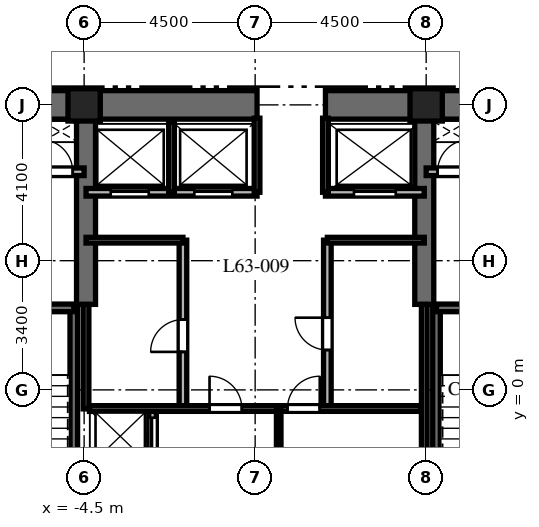
"""IFC4 building model, lengths in metres.
Left out: names, types, materials, properties, quantities, classifications, styles, units other than length and angle.
Written with IfcOpenShell. Run it as: python <this file> out.ifc"""

import sys

from ifc_helpers import new_model, si_unit, direction, frame, frame_2d, origin, origin_2d, place, context, subcontext, project, spatial, rectangle, extrude, element, fill, save


model = new_model("IFC4")
c1 = context("Model", 3, precision=1e-05, world=origin(), true_north=direction((0.0, 1.0)))
c2 = subcontext(c1, "Body", "Model", "MODEL_VIEW")
j1 = project(units=[si_unit("LENGTHUNIT", "METRE"), si_unit("PLANEANGLEUNIT", "RADIAN")], contexts=[c1])
p1 = place(None, origin())
s1 = spatial("IfcSite", under=j1, at=p1, CompositionType="ELEMENT")
p2 = place(p1, origin())
s2 = spatial("IfcBuilding", under=s1, at=p2, CompositionType="ELEMENT")
p3 = place(p2, frame((0.0, 0.0, 252.1)))
s3 = spatial("IfcBuildingStorey", under=s2, at=p3, CompositionType="ELEMENT", Elevation=252.1)
p4 = place(p3, frame((-9.375, 7.5, 0.0), z_axis=(0.0, 0.0, 1.0), x_axis=(1.0, 0.0, 0.0)))
e1 = element("IfcWall", 1, at=p4, inside=s3, PredefinedType="SHEAR", context=c2, shape_type="SweptSolid", body=[
    extrude(rectangle(XDim=9.425, YDim=0.75, at=frame_2d((4.712, 0.0))), origin(), (0.0, 0.0, 1.0), 3.8),
])
p5 = place(p3, frame((1.85, 7.5, 0.0), z_axis=(0.0, 0.0, 1.0), x_axis=(1.0, 0.0, 0.0)))
e2 = element("IfcWall", 2, at=p5, inside=s3, PredefinedType="SHEAR", context=c2, shape_type="SweptSolid", body=[
    extrude(rectangle(XDim=7.525, YDim=0.75, at=frame_2d((3.762, 0.0))), origin(), (0.0, 0.0, 1.0), 3.8),
])
for number, where, z_axis, x_axis in (
    (3, (-4.45, 2.25, 0.0), (0.0, 0.0, 1.0), (0.0, 1.0, 0.0)),
    (4, (4.45, 2.25, 0.0), (0.0, 0.0, 1.0), (0.0, 1.0, 0.0)),
):
    element("IfcWall", number, at=place(p3, frame(where, z_axis=z_axis, x_axis=x_axis)), inside=s3, PredefinedType="SHEAR", context=c2, shape_type="SweptSolid", body=[
        extrude(rectangle(XDim=4.875, YDim=0.5, at=frame_2d((2.438, 0.0))), origin(), (0.0, 0.0, 1.0), 3.8),
    ])
p6 = place(p3, frame((-4.772, -6.985, 0.0), z_axis=(0.0, 0.0, 1.0), x_axis=(0.0, 1.0, 0.0)))
e5 = element("IfcWall", 5, at=p6, inside=s3, PredefinedType="SHEAR", context=c2, shape_type="SweptSolid", body=[
    extrude(rectangle(XDim=9.143, YDim=0.2, at=frame_2d((4.572, 0.0))), origin(), (0.0, 0.0, 1.0), 3.8),
])
p7 = place(p3, frame((-8.458, 2.158, 0.0), z_axis=(0.0, 0.0, 1.0), x_axis=(1.0, 0.0, 0.0)))
e6 = element("IfcWall", 6, at=p7, inside=s3, PredefinedType="SHEAR", context=c2, shape_type="SweptSolid", body=[
    extrude(rectangle(XDim=3.686, YDim=0.2, at=frame_2d((1.843, 0.0))), origin(), (0.0, 0.0, 1.0), 3.8),
])
p8 = place(p7, frame((1.3, 0.0, 0.0)))
e7 = element("IfcOpeningElement", 7, at=p8, cuts=e6, PredefinedType="OPENING", context=c2, shape_type="SweptSolid", body=[
    extrude(rectangle(XDim=1.0, YDim=2.15, at=frame_2d((0.5, 1.075))), frame((0.0, 0.11, 0.0), z_axis=(0.0, -1.0, 0.0), x_axis=(1.0, 0.0, 0.0)), (0.0, 0.0, 1.0), 0.22),
])
p9 = place(p3, frame((4.772, -6.985, 0.0), z_axis=(0.0, 0.0, 1.0), x_axis=(0.0, 1.0, 0.0)))
e8 = element("IfcWall", 8, at=p9, inside=s3, PredefinedType="SHEAR", context=c2, shape_type="SweptSolid", body=[
    extrude(rectangle(XDim=9.143, YDim=0.2, at=frame_2d((4.572, 0.0))), origin(), (0.0, 0.0, 1.0), 3.8),
])
p10 = place(p3, frame((4.772, 2.158, 0.0), z_axis=(0.0, 0.0, 1.0), x_axis=(1.0, 0.0, 0.0)))
e9 = element("IfcWall", 9, at=p10, inside=s3, PredefinedType="SHEAR", context=c2, shape_type="SweptSolid", body=[
    extrude(rectangle(XDim=3.686, YDim=0.2, at=frame_2d((1.843, 0.0))), origin(), (0.0, 0.0, 1.0), 3.8),
])
p11 = place(p10, frame((1.35, 0.0, 0.0)))
e10 = element("IfcOpeningElement", 10, at=p11, cuts=e9, PredefinedType="OPENING", context=c2, shape_type="SweptSolid", body=[
    extrude(rectangle(XDim=1.0, YDim=2.15, at=frame_2d((0.5, 1.075))), frame((0.0, 0.11, 0.0), z_axis=(0.0, -1.0, 0.0), x_axis=(1.0, 0.0, 0.0)), (0.0, 0.0, 1.0), 0.22),
])
for number, where, z_axis, x_axis in (
    (11, (4.5, 7.5, 0.0), (0.0, 0.0, 1.0), (1.0, 0.0, 0.0)),
    (12, (-4.5, 7.5, 0.0), (0.0, 0.0, 1.0), (1.0, 0.0, 0.0)),
):
    element("IfcColumn", number, at=place(p3, frame(where, z_axis=z_axis, x_axis=x_axis)), inside=s3, PredefinedType="COLUMN", context=c2, shape_type="SweptSolid", body=[
        extrude(rectangle(XDim=0.85, YDim=0.85, at=origin_2d()), origin(), (0.0, 0.0, 1.0), 3.8),
    ])
p12 = place(p3, frame((-8.55, 5.74, 0.0), z_axis=(0.0, 0.0, 1.0), x_axis=(1.0, 0.0, 0.0)))
e13 = element("IfcWall", 13, at=p12, inside=s3, PredefinedType="PARTITIONING", context=c2, shape_type="SweptSolid", body=[
    extrude(rectangle(XDim=4.05, YDim=0.2, at=frame_2d((2.025, 0.0))), origin(), (0.0, 0.0, 1.0), 3.48),
])
p13 = place(p12, frame((0.75, 0.0, 0.0)))
e14 = element("IfcOpeningElement", 14, at=p13, cuts=e13, PredefinedType="OPENING", context=c2, shape_type="SweptSolid", body=[
    extrude(rectangle(XDim=1.1, YDim=2.2, at=frame_2d((0.55, 1.1))), frame((0.0, 0.11, 0.0), z_axis=(0.0, -1.0, 0.0), x_axis=(1.0, 0.0, 0.0)), (0.0, 0.0, 1.0), 0.22),
])
p14 = place(p12, frame((2.9, 0.0, 0.0)))
e15 = element("IfcOpeningElement", 15, at=p14, cuts=e13, PredefinedType="OPENING", context=c2, shape_type="SweptSolid", body=[
    extrude(rectangle(XDim=0.85, YDim=2.03, at=frame_2d((0.425, 1.015))), frame((0.0, 0.11, 0.0), z_axis=(0.0, -1.0, 0.0), x_axis=(1.0, 0.0, 0.0)), (0.0, 0.0, 1.0), 0.22),
])
p15 = place(p3, frame((4.5, 5.74, 0.0), z_axis=(0.0, 0.0, 1.0), x_axis=(1.0, 0.0, 0.0)))
e16 = element("IfcWall", 16, at=p15, inside=s3, PredefinedType="PARTITIONING", context=c2, shape_type="SweptSolid", body=[
    extrude(rectangle(XDim=4.05, YDim=0.2, at=frame_2d((2.025, 0.0))), origin(), (0.0, 0.0, 1.0), 3.48),
])
p16 = place(p15, frame((0.3, 0.0, 0.0)))
e17 = element("IfcOpeningElement", 17, at=p16, cuts=e16, PredefinedType="OPENING", context=c2, shape_type="SweptSolid", body=[
    extrude(rectangle(XDim=0.85, YDim=2.03, at=frame_2d((0.425, 1.015))), frame((0.0, 0.11, 0.0), z_axis=(0.0, -1.0, 0.0), x_axis=(1.0, 0.0, 0.0)), (0.0, 0.0, 1.0), 0.22),
])
p17 = place(p15, frame((2.15, 0.0, 0.0)))
e18 = element("IfcOpeningElement", 18, at=p17, cuts=e16, PredefinedType="OPENING", context=c2, shape_type="SweptSolid", body=[
    extrude(rectangle(XDim=1.1, YDim=2.2, at=frame_2d((0.55, 1.1))), frame((0.0, 0.11, 0.0), z_axis=(0.0, -1.0, 0.0), x_axis=(1.0, 0.0, 0.0)), (0.0, 0.0, 1.0), 0.22),
])
p18 = place(p3, frame((-2.7, -1.972, 0.0), z_axis=(0.0, 0.0, 1.0), x_axis=(0.0, 1.0, 0.0)))
e19 = element("IfcWall", 19, at=p18, inside=s3, PredefinedType="PARTITIONING", context=c2, shape_type="SweptSolid", body=[
    extrude(rectangle(XDim=1.472, YDim=0.2, at=frame_2d((0.736, 0.0))), origin(), (0.0, 0.0, 1.0), 3.48),
])
p19 = place(p18, frame((0.24, 0.0, 0.0)))
e20 = element("IfcOpeningElement", 20, at=p19, cuts=e19, PredefinedType="OPENING", context=c2, shape_type="SweptSolid", body=[
    extrude(rectangle(XDim=1.0, YDim=2.2, at=frame_2d((0.5, 1.1))), frame((0.0, 0.11, 0.0), z_axis=(0.0, -1.0, 0.0), x_axis=(1.0, 0.0, 0.0)), (0.0, 0.0, 1.0), 0.22),
])
p20 = place(p3, frame((-4.45, 5.2, 0.0), z_axis=(0.0, 0.0, 1.0), x_axis=(1.0, 0.0, 0.0)))
e21 = element("IfcWall", 21, at=p20, inside=s3, PredefinedType="PARTITIONING", context=c2, shape_type="SweptSolid", body=[
    extrude(rectangle(XDim=4.5, YDim=0.2, at=frame_2d((2.25, 0.0))), origin(), (0.0, 0.0, 1.0), 3.48),
])
p21 = place(p20, frame((0.65, 0.0, 0.0)))
e22 = element("IfcOpeningElement", 22, at=p21, cuts=e21, PredefinedType="OPENING", context=c2, shape_type="SweptSolid", body=[
    extrude(rectangle(XDim=1.0, YDim=2.2, at=frame_2d((0.5, 1.1))), frame((0.0, 0.11, 0.0), z_axis=(0.0, -1.0, 0.0), x_axis=(1.0, 0.0, 0.0)), (0.0, 0.0, 1.0), 0.22),
])
p22 = place(p20, frame((2.85, 0.0, 0.0)))
e23 = element("IfcOpeningElement", 23, at=p22, cuts=e21, PredefinedType="OPENING", context=c2, shape_type="SweptSolid", body=[
    extrude(rectangle(XDim=1.0, YDim=2.2, at=frame_2d((0.5, 1.1))), frame((0.0, 0.11, 0.0), z_axis=(0.0, -1.0, 0.0), x_axis=(1.0, 0.0, 0.0)), (0.0, 0.0, 1.0), 0.22),
])
p23 = place(p3, frame((1.85, 5.2, 0.0), z_axis=(0.0, 0.0, 1.0), x_axis=(1.0, 0.0, 0.0)))
e24 = element("IfcWall", 24, at=p23, inside=s3, PredefinedType="PARTITIONING", context=c2, shape_type="SweptSolid", body=[
    extrude(rectangle(XDim=2.6, YDim=0.2, at=frame_2d((1.3, 0.0))), origin(), (0.0, 0.0, 1.0), 3.48),
])
p24 = place(p23, frame((0.75, 0.0, 0.0)))
e25 = element("IfcOpeningElement", 25, at=p24, cuts=e24, PredefinedType="OPENING", context=c2, shape_type="SweptSolid", body=[
    extrude(rectangle(XDim=1.1, YDim=2.2, at=frame_2d((0.55, 1.1))), frame((0.0, 0.11, 0.0), z_axis=(0.0, -1.0, 0.0), x_axis=(1.0, 0.0, 0.0)), (0.0, 0.0, 1.0), 0.22),
])
p25 = place(p3, frame((-2.2, 5.2, 0.0), z_axis=(0.0, 0.0, 1.0), x_axis=(0.0, 1.0, 0.0)))
e26 = element("IfcWall", 26, at=p25, inside=s3, PredefinedType="PARTITIONING", context=c2, shape_type="SweptSolid", body=[
    extrude(rectangle(XDim=1.85, YDim=0.15, at=frame_2d((0.925, 0.0))), origin(), (0.0, 0.0, 1.0), 3.48),
])
for number, where, z_axis, x_axis in (
    (27, (0.05, 5.2, 0.0), (0.0, 0.0, 1.0), (0.0, 1.0, 0.0)),
    (28, (1.85, 5.2, 0.0), (0.0, 0.0, 1.0), (0.0, 1.0, 0.0)),
):
    element("IfcWall", number, at=place(p3, frame(where, z_axis=z_axis, x_axis=x_axis)), inside=s3, PredefinedType="PARTITIONING", context=c2, shape_type="SweptSolid", body=[
        extrude(rectangle(XDim=1.95, YDim=0.15, at=frame_2d((0.975, 0.0))), origin(), (0.0, 0.0, 1.0), 3.48),
    ])
p26 = place(p3, frame((-4.45, -0.5, 0.0), z_axis=(0.0, 0.0, 1.0), x_axis=(0.0, 1.0, 0.0)))
e29 = element("IfcWall", 29, at=p26, inside=s3, PredefinedType="PARTITIONING", context=c2, shape_type="SweptSolid", body=[
    extrude(rectangle(XDim=2.75, YDim=0.15, at=frame_2d((1.375, 0.0))), origin(), (0.0, 0.0, 1.0), 3.48),
])
p27 = place(p3, frame((4.45, -1.972, 0.0), z_axis=(0.0, 0.0, 1.0), x_axis=(0.0, 1.0, 0.0)))
e30 = element("IfcWall", 30, at=p27, inside=s3, PredefinedType="PARTITIONING", context=c2, shape_type="SweptSolid", body=[
    extrude(rectangle(XDim=4.222, YDim=0.15, at=frame_2d((2.111, 0.0))), origin(), (0.0, 0.0, 1.0), 3.48),
])
p28 = place(p3, frame((-1.9, -0.5, 0.0), z_axis=(0.0, 0.0, 1.0), x_axis=(0.0, 1.0, 0.0)))
e31 = element("IfcWall", 31, at=p28, inside=s3, PredefinedType="PARTITIONING", context=c2, shape_type="SweptSolid", body=[
    extrude(rectangle(XDim=4.44, YDim=0.2, at=frame_2d((2.22, 0.0))), origin(), (0.0, 0.0, 1.0), 3.48),
])
p29 = place(p28, frame((1.5, 0.0, 0.0)))
e32 = element("IfcOpeningElement", 32, at=p29, cuts=e31, PredefinedType="OPENING", context=c2, shape_type="SweptSolid", body=[
    extrude(rectangle(XDim=0.85, YDim=2.03, at=frame_2d((0.425, 1.015))), frame((0.0, 0.11, 0.0), z_axis=(0.0, -1.0, 0.0), x_axis=(1.0, 0.0, 0.0)), (0.0, 0.0, 1.0), 0.22),
])
p30 = place(p3, frame((-4.45, 3.94, 0.0), z_axis=(0.0, 0.0, 1.0), x_axis=(1.0, 0.0, 0.0)))
e33 = element("IfcWall", 33, at=p30, inside=s3, PredefinedType="PARTITIONING", context=c2, shape_type="SweptSolid", body=[
    extrude(rectangle(XDim=2.55, YDim=0.15, at=frame_2d((1.275, 0.0))), origin(), (0.0, 0.0, 1.0), 3.48),
])
p31 = place(p3, frame((1.9, -0.5, 0.0), z_axis=(0.0, 0.0, 1.0), x_axis=(0.0, 1.0, 0.0)))
e34 = element("IfcWall", 34, at=p31, inside=s3, PredefinedType="PARTITIONING", context=c2, shape_type="SweptSolid", body=[
    extrude(rectangle(XDim=4.44, YDim=0.2, at=frame_2d((2.22, 0.0))), origin(), (0.0, 0.0, 1.0), 3.48),
])
p32 = place(p31, frame((1.55, 0.0, 0.0)))
e35 = element("IfcOpeningElement", 35, at=p32, cuts=e34, PredefinedType="OPENING", context=c2, shape_type="SweptSolid", body=[
    extrude(rectangle(XDim=0.85, YDim=2.03, at=frame_2d((0.425, 1.015))), frame((0.0, 0.11, 0.0), z_axis=(0.0, -1.0, 0.0), x_axis=(1.0, 0.0, 0.0)), (0.0, 0.0, 1.0), 0.22),
])
p33 = place(p3, frame((1.9, 3.94, 0.0), z_axis=(0.0, 0.0, 1.0), x_axis=(1.0, 0.0, 0.0)))
e36 = element("IfcWall", 36, at=p33, inside=s3, PredefinedType="PARTITIONING", context=c2, shape_type="SweptSolid", body=[
    extrude(rectangle(XDim=2.55, YDim=0.15, at=frame_2d((1.275, 0.0))), origin(), (0.0, 0.0, 1.0), 3.48),
])
p34 = place(p3, frame((-4.36, -0.49, 0.0), z_axis=(0.0, 0.0, 1.0), x_axis=(1.0, 0.0, 0.0)))
e37 = element("IfcWall", 37, at=p34, inside=s3, PredefinedType="PARTITIONING", context=c2, shape_type="SweptSolid", body=[
    extrude(rectangle(XDim=8.72, YDim=0.15, at=frame_2d((4.36, 0.0))), origin(), (0.0, 0.0, 1.0), 3.48),
])
p35 = place(p34, frame((3.16, 0.0, 0.0)))
e38 = element("IfcOpeningElement", 38, at=p35, cuts=e37, PredefinedType="OPENING", context=c2, shape_type="SweptSolid", body=[
    extrude(rectangle(XDim=0.85, YDim=2.03, at=frame_2d((0.425, 1.015))), frame((0.0, 0.085, 0.0), z_axis=(0.0, -1.0, 0.0), x_axis=(1.0, 0.0, 0.0)), (0.0, 0.0, 1.0), 0.17),
])
p36 = place(p34, frame((5.21, 0.0, 0.0)))
e39 = element("IfcOpeningElement", 39, at=p36, cuts=e37, PredefinedType="OPENING", context=c2, shape_type="SweptSolid", body=[
    extrude(rectangle(XDim=0.85, YDim=2.03, at=frame_2d((0.425, 1.015))), frame((0.0, 0.085, 0.0), z_axis=(0.0, -1.0, 0.0), x_axis=(1.0, 0.0, 0.0)), (0.0, 0.0, 1.0), 0.17),
])
p37 = place(p3, frame((0.62, -1.972, 0.0), z_axis=(0.0, 0.0, 1.0), x_axis=(0.0, 1.0, 0.0)))
e40 = element("IfcWall", 40, at=p37, inside=s3, PredefinedType="PARTITIONING", context=c2, shape_type="SweptSolid", body=[
    extrude(rectangle(XDim=1.472, YDim=0.12, at=frame_2d((0.736, 0.0))), origin(), (0.0, 0.0, 1.0), 3.48),
])
p38 = place(p14, origin())
e41 = element("IfcDoor", 41, at=p38, inside=s3, OperationType="SINGLE_SWING_LEFT", PredefinedType="DOOR", context=c2, shape_type="SweptSolid", body=[
    extrude(rectangle(XDim=0.85, YDim=2.03, at=frame_2d((0.425, 1.015))), frame((0.0, 0.025, 0.0), z_axis=(0.0, -1.0, 0.0), x_axis=(1.0, 0.0, 0.0)), (0.0, 0.0, 1.0), 0.05),
])
fill(e15, e41)
p39 = place(p16, origin())
e42 = element("IfcDoor", 42, at=p39, inside=s3, OperationType="SINGLE_SWING_RIGHT", PredefinedType="DOOR", context=c2, shape_type="SweptSolid", body=[
    extrude(rectangle(XDim=0.85, YDim=2.03, at=frame_2d((0.425, 1.015))), frame((0.0, 0.025, 0.0), z_axis=(0.0, -1.0, 0.0), x_axis=(1.0, 0.0, 0.0)), (0.0, 0.0, 1.0), 0.05),
])
fill(e17, e42)
p40 = place(p19, origin())
e43 = element("IfcDoor", 43, at=p40, inside=s3, OperationType="SLIDING_TO_LEFT", PredefinedType="DOOR", context=c2, shape_type="SweptSolid", body=[
    extrude(rectangle(XDim=1.0, YDim=2.2, at=frame_2d((0.5, 1.1))), frame((0.0, 0.025, 0.0), z_axis=(0.0, -1.0, 0.0), x_axis=(1.0, 0.0, 0.0)), (0.0, 0.0, 1.0), 0.05),
])
fill(e20, e43)
p41 = place(p21, origin())
e44 = element("IfcDoor", 44, at=p41, inside=s3, OperationType="SLIDING_TO_LEFT", PredefinedType="DOOR", context=c2, shape_type="SweptSolid", body=[
    extrude(rectangle(XDim=1.0, YDim=2.2, at=frame_2d((0.5, 1.1))), frame((0.0, 0.025, 0.0), z_axis=(0.0, -1.0, 0.0), x_axis=(1.0, 0.0, 0.0)), (0.0, 0.0, 1.0), 0.05),
])
fill(e22, e44)
p42 = place(p22, origin())
e45 = element("IfcDoor", 45, at=p42, inside=s3, OperationType="SLIDING_TO_RIGHT", PredefinedType="DOOR", context=c2, shape_type="SweptSolid", body=[
    extrude(rectangle(XDim=1.0, YDim=2.2, at=frame_2d((0.5, 1.1))), frame((0.0, 0.025, 0.0), z_axis=(0.0, -1.0, 0.0), x_axis=(1.0, 0.0, 0.0)), (0.0, 0.0, 1.0), 0.05),
])
fill(e23, e45)
p43 = place(p24, origin())
e46 = element("IfcDoor", 46, at=p43, inside=s3, OperationType="SLIDING_TO_RIGHT", PredefinedType="DOOR", context=c2, shape_type="SweptSolid", body=[
    extrude(rectangle(XDim=1.1, YDim=2.2, at=frame_2d((0.55, 1.1))), frame((0.0, 0.025, 0.0), z_axis=(0.0, -1.0, 0.0), x_axis=(1.0, 0.0, 0.0)), (0.0, 0.0, 1.0), 0.05),
])
fill(e25, e46)
p44 = place(p29, origin())
e47 = element("IfcDoor", 47, at=p44, inside=s3, OperationType="SINGLE_SWING_LEFT", PredefinedType="DOOR", context=c2, shape_type="SweptSolid", body=[
    extrude(rectangle(XDim=0.85, YDim=2.03, at=frame_2d((0.425, 1.015))), frame((0.0, 0.025, 0.0), z_axis=(0.0, -1.0, 0.0), x_axis=(1.0, 0.0, 0.0)), (0.0, 0.0, 1.0), 0.05),
])
fill(e32, e47)
p45 = place(p32, origin())
e48 = element("IfcDoor", 48, at=p45, inside=s3, OperationType="SINGLE_SWING_RIGHT", PredefinedType="DOOR", context=c2, shape_type="SweptSolid", body=[
    extrude(rectangle(XDim=0.85, YDim=2.03, at=frame_2d((0.425, 1.015))), frame((0.0, 0.025, 0.0), z_axis=(0.0, -1.0, 0.0), x_axis=(1.0, 0.0, 0.0)), (0.0, 0.0, 1.0), 0.05),
])
fill(e35, e48)
p46 = place(p35, origin())
e49 = element("IfcDoor", 49, at=p46, inside=s3, OperationType="SINGLE_SWING_LEFT", PredefinedType="DOOR", context=c2, shape_type="SweptSolid", body=[
    extrude(rectangle(XDim=0.85, YDim=2.03, at=frame_2d((0.425, 1.015))), frame((0.0, 0.025, 0.0), z_axis=(0.0, -1.0, 0.0), x_axis=(1.0, 0.0, 0.0)), (0.0, 0.0, 1.0), 0.05),
])
fill(e38, e49)
p47 = place(p36, origin())
e50 = element("IfcDoor", 50, at=p47, inside=s3, OperationType="SINGLE_SWING_RIGHT", PredefinedType="DOOR", context=c2, shape_type="SweptSolid", body=[
    extrude(rectangle(XDim=0.85, YDim=2.03, at=frame_2d((0.425, 1.015))), frame((0.0, 0.025, 0.0), z_axis=(0.0, -1.0, 0.0), x_axis=(1.0, 0.0, 0.0)), (0.0, 0.0, 1.0), 0.05),
])
fill(e39, e50)
save(model, sys.argv[1])
